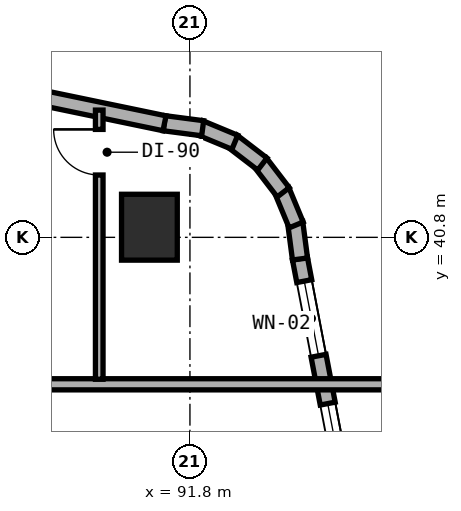
"""IFC4 building model, lengths in metres.
Left out: names, types, materials, properties, quantities, classifications, styles, units other than length and angle.
Written with IfcOpenShell. Run it as: python <this file> out.ifc"""

import sys

from ifc_helpers import new_model, si_unit, direction, frame, frame_2d, origin, origin_2d, place, context, subcontext, project, spatial, rectangle, extrude, element, fill, save


model = new_model("IFC4")
c1 = context("Model", 3, precision=1e-05, world=origin(), true_north=direction((0.0, 1.0)))
c2 = subcontext(c1, "Body", "Model", "MODEL_VIEW")
j1 = project(units=[si_unit("LENGTHUNIT", "METRE"), si_unit("PLANEANGLEUNIT", "RADIAN")], contexts=[c1])
p1 = place(None, origin())
s1 = spatial("IfcSite", under=j1, at=p1, CompositionType="ELEMENT")
p2 = place(p1, origin())
s2 = spatial("IfcBuilding", under=s1, at=p2, CompositionType="ELEMENT")
p3 = place(p2, frame((0.0, 0.0, 24.0)))
s3 = spatial("IfcBuildingStorey", under=s2, at=p3, CompositionType="ELEMENT", Elevation=24.0)
p4 = place(p3, frame((91.0, 41.0, 0.0), z_axis=(0.0, 0.0, 1.0), x_axis=(1.0, 0.0, 0.0)))
e1 = element("IfcColumn", 1, at=p4, inside=s3, PredefinedType="COLUMN", context=c2, shape_type="SweptSolid", body=[
    extrude(rectangle(XDim=1.1, YDim=1.3, at=origin_2d()), origin(), (0.0, 0.0, 1.0), 3.5),
])
p5 = place(p3, frame((95.783, 30.918, 0.0), z_axis=(0.0, 0.0, 1.0), x_axis=(-0.188087874316, 0.982152203854, 0.0)))
e2 = element("IfcWall", 2, at=p5, inside=s3, PredefinedType="STANDARD", context=c2, shape_type="SweptSolid", body=[
    extrude(rectangle(XDim=9.634, YDim=0.3, at=frame_2d((4.817, 0.0))), origin(), (0.0, 0.0, 1.0), 3.25),
])
p6 = place(p5, frame((1.306, 0.0, 0.8)))
e3 = element("IfcOpeningElement", 3, at=p6, cuts=e2, PredefinedType="OPENING", context=c2, shape_type="SweptSolid", body=[
    extrude(rectangle(XDim=2.4, YDim=1.6, at=frame_2d((1.2, 0.8))), frame((0.0, 0.16, 0.0), z_axis=(0.0, -1.0, 0.0), x_axis=(1.0, 0.0, 0.0)), (0.0, 0.0, 1.0), 0.32),
])
p7 = place(p5, frame((5.521, 0.0, 0.85)))
e4 = element("IfcOpeningElement", 4, at=p7, cuts=e2, PredefinedType="OPENING", context=c2, shape_type="SweptSolid", body=[
    extrude(rectangle(XDim=1.2, YDim=1.5, at=frame_2d((0.6, 0.75))), frame((0.0, 0.16, 0.0), z_axis=(0.0, -1.0, 0.0), x_axis=(1.0, 0.0, 0.0)), (0.0, 0.0, 1.0), 0.32),
])
p8 = place(p5, frame((7.682, 0.0, 0.85)))
e5 = element("IfcOpeningElement", 5, at=p8, cuts=e2, PredefinedType="OPENING", context=c2, shape_type="SweptSolid", body=[
    extrude(rectangle(XDim=1.5, YDim=1.5, at=frame_2d((0.75, 0.75))), frame((0.0, 0.16, 0.0), z_axis=(0.0, -1.0, 0.0), x_axis=(1.0, 0.0, 0.0)), (0.0, 0.0, 1.0), 0.32),
])
p9 = place(p3, frame((93.972, 40.373, 0.0), z_axis=(0.0, 0.0, 1.0), x_axis=(-0.130255288807, 0.991480488834, 0.0)))
e6 = element("IfcWall", 6, at=p9, inside=s3, PredefinedType="STANDARD", context=c2, shape_type="SweptSolid", body=[
    extrude(rectangle(XDim=0.729, YDim=0.3, at=frame_2d((0.365, 0.0))), origin(), (0.0, 0.0, 1.0), 3.25),
])
p10 = place(p3, frame((93.896, 41.045, 0.0), z_axis=(0.0, 0.0, 1.0), x_axis=(-0.383267045233, 0.923637576129, 0.0)))
e7 = element("IfcWall", 7, at=p10, inside=s3, PredefinedType="STANDARD", context=c2, shape_type="SweptSolid", body=[
    extrude(rectangle(XDim=0.746, YDim=0.3, at=frame_2d((0.373, 0.0))), origin(), (0.0, 0.0, 1.0), 3.25),
])
for number, where, z_axis, x_axis in (
    (8, (93.641, 41.689, 0.0), (0.0, 0.0, 1.0), (-0.609, 0.793, 0.0)),
    (9, (93.229, 42.246, 0.0), (0.0, 0.0, 1.0), (-0.794, 0.608, 0.0)),
):
    element("IfcWall", number, at=place(p3, frame(where, z_axis=z_axis, x_axis=x_axis)), inside=s3, PredefinedType="STANDARD", context=c2, shape_type="SweptSolid", body=[
        extrude(rectangle(XDim=0.746, YDim=0.3, at=frame_2d((0.373, 0.0))), origin(), (0.0, 0.0, 1.0), 3.25),
    ])
p11 = place(p3, frame((92.686, 42.676, 0.0), z_axis=(0.0, 0.0, 1.0), x_axis=(-0.923637576129, 0.383267045233, 0.0)))
e10 = element("IfcWall", 10, at=p11, inside=s3, PredefinedType="STANDARD", context=c2, shape_type="SweptSolid", body=[
    extrude(rectangle(XDim=0.746, YDim=0.3, at=frame_2d((0.373, 0.0))), origin(), (0.0, 0.0, 1.0), 3.25),
])
p12 = place(p3, frame((92.051, 42.953, 0.0), z_axis=(0.0, 0.0, 1.0), x_axis=(-0.991559404866, 0.129653178221, 0.0)))
e11 = element("IfcWall", 11, at=p12, inside=s3, PredefinedType="STANDARD", context=c2, shape_type="SweptSolid", body=[
    extrude(rectangle(XDim=0.764, YDim=0.3, at=frame_2d((0.382, 0.0))), origin(), (0.0, 0.0, 1.0), 3.25),
])
p13 = place(p3, frame((91.298, 43.051, 0.0), z_axis=(0.0, 0.0, 1.0), x_axis=(-0.979128391325, 0.203242695569, 0.0)))
e12 = element("IfcWall", 12, at=p13, inside=s3, PredefinedType="STANDARD", context=c2, shape_type="SweptSolid", body=[
    extrude(rectangle(XDim=8.92, YDim=0.3, at=frame_2d((4.46, 0.0))), origin(), (0.0, 0.0, 1.0), 3.25),
])
p14 = place(p13, frame((3.957, 0.0, 0.8)))
e13 = element("IfcOpeningElement", 13, at=p14, cuts=e12, PredefinedType="OPENING", context=c2, shape_type="SweptSolid", body=[
    extrude(rectangle(XDim=2.4, YDim=1.6, at=frame_2d((1.2, 0.8))), frame((0.0, 0.16, 0.0), z_axis=(0.0, -1.0, 0.0), x_axis=(1.0, 0.0, 0.0)), (0.0, 0.0, 1.0), 0.32),
])
p15 = place(p3, frame((88.35, 37.9, 0.0), z_axis=(0.0, 0.0, 1.0), x_axis=(1.0, 0.0, 0.0)))
e14 = element("IfcWall", 14, at=p15, inside=s3, PredefinedType="SOLIDWALL", context=c2, shape_type="SweptSolid", body=[
    extrude(rectangle(XDim=7.41, YDim=0.22, at=frame_2d((3.705, 0.0))), origin(), (0.0, 0.0, 1.0), 2.865),
])
p16 = place(p3, frame((90.01, 38.0, 0.0), z_axis=(0.0, 0.0, 1.0), x_axis=(0.0, 1.0, 0.0)))
e15 = element("IfcWall", 15, at=p16, inside=s3, PredefinedType="PARTITIONING", context=c2, shape_type="SweptSolid", body=[
    extrude(rectangle(XDim=5.311, YDim=0.15, at=frame_2d((2.656, 0.0))), origin(), (0.0, 0.0, 1.0), 2.865),
])
p17 = place(p16, frame((4.03, 0.0, 0.0)))
e16 = element("IfcOpeningElement", 16, at=p17, cuts=e15, PredefinedType="OPENING", context=c2, shape_type="SweptSolid", body=[
    extrude(rectangle(XDim=0.9, YDim=2.1, at=frame_2d((0.45, 1.05))), frame((0.0, 0.085, 0.0), z_axis=(0.0, -1.0, 0.0), x_axis=(1.0, 0.0, 0.0)), (0.0, 0.0, 1.0), 0.17),
])
p18 = place(p7, origin())
e17 = element("IfcWindow", 17, at=p18, inside=s3, PartitioningType="SINGLE_PANEL", PredefinedType="WINDOW", context=c2, shape_type="SweptSolid", body=[
    extrude(rectangle(XDim=1.2, YDim=1.5, at=frame_2d((0.6, 0.75))), frame((0.0, 0.03, 0.0), z_axis=(0.0, -1.0, 0.0), x_axis=(1.0, 0.0, 0.0)), (0.0, 0.0, 1.0), 0.06),
])
fill(e4, e17)
p19 = place(p8, origin())
e18 = element("IfcWindow", 18, at=p19, inside=s3, PartitioningType="SINGLE_PANEL", PredefinedType="WINDOW", context=c2, shape_type="SweptSolid", body=[
    extrude(rectangle(XDim=1.5, YDim=1.5, at=frame_2d((0.75, 0.75))), frame((0.0, 0.03, 0.0), z_axis=(0.0, -1.0, 0.0), x_axis=(1.0, 0.0, 0.0)), (0.0, 0.0, 1.0), 0.06),
])
fill(e5, e18)
p20 = place(p17, origin())
e19 = element("IfcDoor", 19, at=p20, inside=s3, OperationType="SINGLE_SWING_RIGHT", PredefinedType="DOOR", context=c2, shape_type="SweptSolid", body=[
    extrude(rectangle(XDim=0.9, YDim=2.1, at=frame_2d((0.45, 1.05))), frame((0.0, 0.025, 0.0), z_axis=(0.0, -1.0, 0.0), x_axis=(1.0, 0.0, 0.0)), (0.0, 0.0, 1.0), 0.05),
])
fill(e16, e19)
save(model, sys.argv[1])
